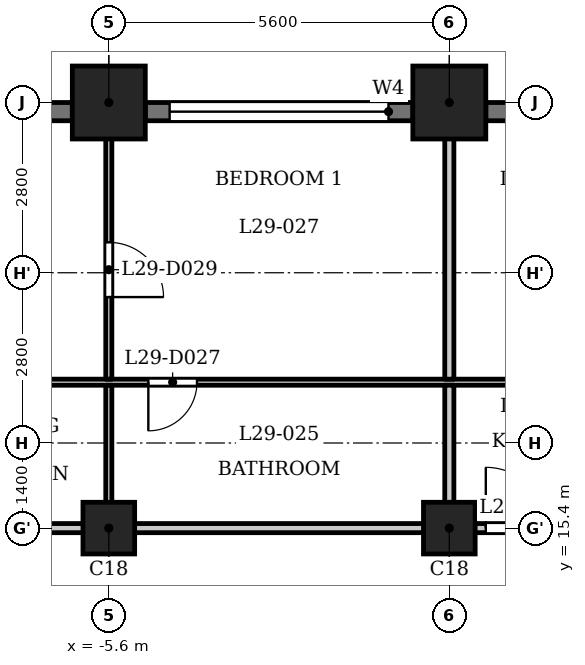
"""IFC4 building model, lengths in metres.
Left out: names, types, materials, properties, quantities, classifications, styles, units other than length and angle.
Written with IfcOpenShell. Run it as: python <this file> out.ifc"""

import sys

from ifc_helpers import new_model, si_unit, direction, frame, frame_2d, origin, origin_2d, place, context, subcontext, project, spatial, rectangle, extrude, element, fill, save


model = new_model("IFC4")
c1 = context("Model", 3, precision=1e-05, world=origin(), true_north=direction((0.0, 1.0)))
c2 = subcontext(c1, "Body", "Model", "MODEL_VIEW")
j1 = project(units=[si_unit("LENGTHUNIT", "METRE"), si_unit("PLANEANGLEUNIT", "RADIAN")], contexts=[c1])
p1 = place(None, origin())
s1 = spatial("IfcSite", under=j1, at=p1, CompositionType="ELEMENT")
p2 = place(p1, origin())
s2 = spatial("IfcBuilding", under=s1, at=p2, CompositionType="ELEMENT")
p3 = place(p2, frame((0.0, 0.0, 114.8)))
s3 = spatial("IfcBuildingStorey", under=s2, at=p3, CompositionType="ELEMENT", Elevation=114.8)
for number, where, z_axis, x_axis in (
    (1, (0.0, 22.4, 0.0), (0.0, 0.0, 1.0), (1.0, 0.0, 0.0)),
    (2, (-5.6, 22.4, 0.0), (0.0, 0.0, 1.0), (1.0, 0.0, 0.0)),
):
    element("IfcColumn", number, at=place(p3, frame(where, z_axis=z_axis, x_axis=x_axis)), inside=s3, PredefinedType="COLUMN", context=c2, shape_type="SweptSolid", body=[
        extrude(rectangle(XDim=1.2, YDim=1.2, at=origin_2d()), origin(), (0.0, 0.0, 1.0), 3.5),
    ])
for number, where, z_axis, x_axis in (
    (3, (-5.6, 15.4, 0.0), (0.0, 0.0, 1.0), (1.0, 0.0, 0.0)),
    (4, (0.0, 15.4, 0.0), (0.0, 0.0, 1.0), (1.0, 0.0, 0.0)),
):
    element("IfcColumn", number, at=place(p3, frame(where, z_axis=z_axis, x_axis=x_axis)), inside=s3, PredefinedType="COLUMN", context=c2, shape_type="SweptSolid", body=[
        extrude(rectangle(XDim=0.85, YDim=0.85, at=origin_2d()), origin(), (0.0, 0.0, 1.0), 3.5),
    ])
p4 = place(p3, frame((5.0, 22.25, 0.0), z_axis=(0.0, 0.0, 1.0), x_axis=(-1.0, 0.0, 0.0)))
e5 = element("IfcWall", 5, at=p4, inside=s3, PredefinedType="SOLIDWALL", context=c2, shape_type="SweptSolid", body=[
    extrude(rectangle(XDim=4.4, YDim=0.3, at=frame_2d((2.2, 0.0))), origin(), (0.0, 0.0, 1.0), 2.4),
])
p5 = place(p4, frame((0.4, 0.0, 1.2)))
e6 = element("IfcOpeningElement", 6, at=p5, cuts=e5, PredefinedType="OPENING", context=c2, shape_type="SweptSolid", body=[
    extrude(rectangle(XDim=3.6, YDim=0.95, at=frame_2d((1.8, 0.475))), frame((0.0, 0.16, 0.0), z_axis=(0.0, -1.0, 0.0), x_axis=(1.0, 0.0, 0.0)), (0.0, 0.0, 1.0), 0.32),
])
p6 = place(p3, frame((-0.6, 22.25, 0.0), z_axis=(0.0, 0.0, 1.0), x_axis=(-1.0, 0.0, 0.0)))
e7 = element("IfcWall", 7, at=p6, inside=s3, PredefinedType="SOLIDWALL", context=c2, shape_type="SweptSolid", body=[
    extrude(rectangle(XDim=4.4, YDim=0.3, at=frame_2d((2.2, 0.0))), origin(), (0.0, 0.0, 1.0), 2.4),
])
p7 = place(p6, frame((0.4, 0.0, 1.2)))
e8 = element("IfcOpeningElement", 8, at=p7, cuts=e7, PredefinedType="OPENING", context=c2, shape_type="SweptSolid", body=[
    extrude(rectangle(XDim=3.6, YDim=0.95, at=frame_2d((1.8, 0.475))), frame((0.0, 0.16, 0.0), z_axis=(0.0, -1.0, 0.0), x_axis=(1.0, 0.0, 0.0)), (0.0, 0.0, 1.0), 0.32),
])
p8 = place(p3, frame((-6.2, 22.25, 0.0), z_axis=(0.0, 0.0, 1.0), x_axis=(-1.0, 0.0, 0.0)))
e9 = element("IfcWall", 9, at=p8, inside=s3, PredefinedType="SOLIDWALL", context=c2, shape_type="SweptSolid", body=[
    extrude(rectangle(XDim=4.4, YDim=0.3, at=frame_2d((2.2, 0.0))), origin(), (0.0, 0.0, 1.0), 2.4),
])
p9 = place(p8, frame((0.4, 0.0, 1.2)))
e10 = element("IfcOpeningElement", 10, at=p9, cuts=e9, PredefinedType="OPENING", context=c2, shape_type="SweptSolid", body=[
    extrude(rectangle(XDim=3.6, YDim=0.95, at=frame_2d((1.8, 0.475))), frame((0.0, 0.16, 0.0), z_axis=(0.0, -1.0, 0.0), x_axis=(1.0, 0.0, 0.0)), (0.0, 0.0, 1.0), 0.32),
])
p10 = place(p3, frame((-27.484, 15.4, 0.0), z_axis=(0.0, 0.0, 1.0), x_axis=(1.0, 0.0, 0.0)))
e11 = element("IfcWall", 11, at=p10, inside=s3, PredefinedType="PARTITIONING", context=c2, shape_type="SweptSolid", body=[
    extrude(rectangle(XDim=54.968, YDim=0.15, at=frame_2d((27.484, 0.0))), origin(), (0.0, 0.0, 1.0), 3.2),
])
p11 = place(p10, frame((9.034, 0.0, 0.0)))
e12 = element("IfcOpeningElement", 12, at=p11, cuts=e11, PredefinedType="OPENING", context=c2, shape_type="SweptSolid", body=[
    extrude(rectangle(XDim=1.0, YDim=2.1, at=frame_2d((0.5, 1.05))), frame((0.0, 0.085, 0.0), z_axis=(0.0, -1.0, 0.0), x_axis=(1.0, 0.0, 0.0)), (0.0, 0.0, 1.0), 0.17),
])
p12 = place(p10, frame((14.634, 0.0, 0.0)))
e13 = element("IfcOpeningElement", 13, at=p12, cuts=e11, PredefinedType="OPENING", context=c2, shape_type="SweptSolid", body=[
    extrude(rectangle(XDim=1.0, YDim=2.1, at=frame_2d((0.5, 1.05))), frame((0.0, 0.085, 0.0), z_axis=(0.0, -1.0, 0.0), x_axis=(1.0, 0.0, 0.0)), (0.0, 0.0, 1.0), 0.17),
])
p13 = place(p10, frame((16.984, 0.0, 0.0)))
e14 = element("IfcOpeningElement", 14, at=p13, cuts=e11, PredefinedType="OPENING", context=c2, shape_type="SweptSolid", body=[
    extrude(rectangle(XDim=1.0, YDim=2.1, at=frame_2d((0.5, 1.05))), frame((0.0, 0.085, 0.0), z_axis=(0.0, -1.0, 0.0), x_axis=(1.0, 0.0, 0.0)), (0.0, 0.0, 1.0), 0.17),
])
p14 = place(p10, frame((28.084, 0.0, 0.0)))
e15 = element("IfcOpeningElement", 15, at=p14, cuts=e11, PredefinedType="OPENING", context=c2, shape_type="SweptSolid", body=[
    extrude(rectangle(XDim=1.0, YDim=2.1, at=frame_2d((0.5, 1.05))), frame((0.0, 0.085, 0.0), z_axis=(0.0, -1.0, 0.0), x_axis=(1.0, 0.0, 0.0)), (0.0, 0.0, 1.0), 0.17),
])
p15 = place(p10, frame((34.834, 0.0, 0.0)))
e16 = element("IfcOpeningElement", 16, at=p15, cuts=e11, PredefinedType="OPENING", context=c2, shape_type="SweptSolid", body=[
    extrude(rectangle(XDim=1.0, YDim=2.1, at=frame_2d((0.5, 1.05))), frame((0.0, 0.085, 0.0), z_axis=(0.0, -1.0, 0.0), x_axis=(1.0, 0.0, 0.0)), (0.0, 0.0, 1.0), 0.17),
])
p16 = place(p10, frame((41.884, 0.0, 0.0)))
e17 = element("IfcOpeningElement", 17, at=p16, cuts=e11, PredefinedType="OPENING", context=c2, shape_type="SweptSolid", body=[
    extrude(rectangle(XDim=1.0, YDim=2.1, at=frame_2d((0.5, 1.05))), frame((0.0, 0.085, 0.0), z_axis=(0.0, -1.0, 0.0), x_axis=(1.0, 0.0, 0.0)), (0.0, 0.0, 1.0), 0.17),
])
p17 = place(p10, frame((48.234, 0.0, 0.0)))
e18 = element("IfcOpeningElement", 18, at=p17, cuts=e11, PredefinedType="OPENING", context=c2, shape_type="SweptSolid", body=[
    extrude(rectangle(XDim=1.0, YDim=2.1, at=frame_2d((0.5, 1.05))), frame((0.0, 0.085, 0.0), z_axis=(0.0, -1.0, 0.0), x_axis=(1.0, 0.0, 0.0)), (0.0, 0.0, 1.0), 0.17),
])
p18 = place(p3, frame((-26.465, 17.8, 0.0), z_axis=(0.0, 0.0, 1.0), x_axis=(1.0, 0.0, 0.0)))
e19 = element("IfcWall", 19, at=p18, inside=s3, PredefinedType="PARTITIONING", context=c2, shape_type="SweptSolid", body=[
    extrude(rectangle(XDim=52.859, YDim=0.1, at=frame_2d((26.43, 0.0))), origin(), (0.0, 0.0, 1.0), 3.2),
])
p19 = place(p18, frame((2.697, 0.0, 0.0)))
e20 = element("IfcOpeningElement", 20, at=p19, cuts=e19, PredefinedType="OPENING", context=c2, shape_type="SweptSolid", body=[
    extrude(rectangle(XDim=0.8, YDim=2.1, at=frame_2d((0.4, 1.05))), frame((0.0, 0.06, 0.0), z_axis=(0.0, -1.0, 0.0), x_axis=(1.0, 0.0, 0.0)), (0.0, 0.0, 1.0), 0.12),
])
p20 = place(p18, frame((7.115, 0.0, 0.0)))
e21 = element("IfcOpeningElement", 21, at=p20, cuts=e19, PredefinedType="OPENING", context=c2, shape_type="SweptSolid", body=[
    extrude(rectangle(XDim=0.9, YDim=2.1, at=frame_2d((0.45, 1.05))), frame((0.0, 0.06, 0.0), z_axis=(0.0, -1.0, 0.0), x_axis=(1.0, 0.0, 0.0)), (0.0, 0.0, 1.0), 0.12),
])
p21 = place(p18, frame((10.315, 0.0, 0.0)))
e22 = element("IfcOpeningElement", 22, at=p21, cuts=e19, PredefinedType="OPENING", context=c2, shape_type="SweptSolid", body=[
    extrude(rectangle(XDim=0.8, YDim=2.1, at=frame_2d((0.4, 1.05))), frame((0.0, 0.06, 0.0), z_axis=(0.0, -1.0, 0.0), x_axis=(1.0, 0.0, 0.0)), (0.0, 0.0, 1.0), 0.12),
])
p22 = place(p18, frame((12.715, 0.0, 0.0)))
e23 = element("IfcOpeningElement", 23, at=p22, cuts=e19, PredefinedType="OPENING", context=c2, shape_type="SweptSolid", body=[
    extrude(rectangle(XDim=0.9, YDim=2.1, at=frame_2d((0.45, 1.05))), frame((0.0, 0.06, 0.0), z_axis=(0.0, -1.0, 0.0), x_axis=(1.0, 0.0, 0.0)), (0.0, 0.0, 1.0), 0.12),
])
p23 = place(p18, frame((21.515, 0.0, 0.0)))
e24 = element("IfcOpeningElement", 24, at=p23, cuts=e19, PredefinedType="OPENING", context=c2, shape_type="SweptSolid", body=[
    extrude(rectangle(XDim=0.8, YDim=2.1, at=frame_2d((0.4, 1.05))), frame((0.0, 0.06, 0.0), z_axis=(0.0, -1.0, 0.0), x_axis=(1.0, 0.0, 0.0)), (0.0, 0.0, 1.0), 0.12),
])
p24 = place(p18, frame((17.065, 0.0, 0.0)))
e25 = element("IfcOpeningElement", 25, at=p24, cuts=e19, PredefinedType="OPENING", context=c2, shape_type="SweptSolid", body=[
    extrude(rectangle(XDim=0.9, YDim=2.1, at=frame_2d((0.45, 1.05))), frame((0.0, 0.06, 0.0), z_axis=(0.0, -1.0, 0.0), x_axis=(1.0, 0.0, 0.0)), (0.0, 0.0, 1.0), 0.12),
])
p25 = place(p18, frame((30.365, 0.0, 0.0)))
e26 = element("IfcOpeningElement", 26, at=p25, cuts=e19, PredefinedType="OPENING", context=c2, shape_type="SweptSolid", body=[
    extrude(rectangle(XDim=0.8, YDim=2.1, at=frame_2d((0.4, 1.05))), frame((0.0, 0.06, 0.0), z_axis=(0.0, -1.0, 0.0), x_axis=(1.0, 0.0, 0.0)), (0.0, 0.0, 1.0), 0.12),
])
p26 = place(p18, frame((28.165, 0.0, 0.0)))
e27 = element("IfcOpeningElement", 27, at=p26, cuts=e19, PredefinedType="OPENING", context=c2, shape_type="SweptSolid", body=[
    extrude(rectangle(XDim=0.9, YDim=2.1, at=frame_2d((0.45, 1.05))), frame((0.0, 0.06, 0.0), z_axis=(0.0, -1.0, 0.0), x_axis=(1.0, 0.0, 0.0)), (0.0, 0.0, 1.0), 0.12),
])
p27 = place(p18, frame((36.115, 0.0, 0.0)))
e28 = element("IfcOpeningElement", 28, at=p27, cuts=e19, PredefinedType="OPENING", context=c2, shape_type="SweptSolid", body=[
    extrude(rectangle(XDim=0.8, YDim=2.1, at=frame_2d((0.4, 1.05))), frame((0.0, 0.06, 0.0), z_axis=(0.0, -1.0, 0.0), x_axis=(1.0, 0.0, 0.0)), (0.0, 0.0, 1.0), 0.12),
])
p28 = place(p18, frame((32.915, 0.0, 0.0)))
e29 = element("IfcOpeningElement", 29, at=p28, cuts=e19, PredefinedType="OPENING", context=c2, shape_type="SweptSolid", body=[
    extrude(rectangle(XDim=0.9, YDim=2.1, at=frame_2d((0.45, 1.05))), frame((0.0, 0.06, 0.0), z_axis=(0.0, -1.0, 0.0), x_axis=(1.0, 0.0, 0.0)), (0.0, 0.0, 1.0), 0.12),
])
p29 = place(p18, frame((38.315, 0.0, 0.0)))
e30 = element("IfcOpeningElement", 30, at=p29, cuts=e19, PredefinedType="OPENING", context=c2, shape_type="SweptSolid", body=[
    extrude(rectangle(XDim=0.8, YDim=2.1, at=frame_2d((0.4, 1.05))), frame((0.0, 0.06, 0.0), z_axis=(0.0, -1.0, 0.0), x_axis=(1.0, 0.0, 0.0)), (0.0, 0.0, 1.0), 0.12),
])
p30 = place(p18, frame((40.965, 0.0, 0.0)))
e31 = element("IfcOpeningElement", 31, at=p30, cuts=e19, PredefinedType="OPENING", context=c2, shape_type="SweptSolid", body=[
    extrude(rectangle(XDim=0.9, YDim=2.1, at=frame_2d((0.45, 1.05))), frame((0.0, 0.06, 0.0), z_axis=(0.0, -1.0, 0.0), x_axis=(1.0, 0.0, 0.0)), (0.0, 0.0, 1.0), 0.12),
])
p31 = place(p18, frame((51.265, 0.0, 0.0)))
e32 = element("IfcOpeningElement", 32, at=p31, cuts=e19, PredefinedType="OPENING", context=c2, shape_type="SweptSolid", body=[
    extrude(rectangle(XDim=0.8, YDim=2.1, at=frame_2d((0.4, 1.05))), frame((0.0, 0.06, 0.0), z_axis=(0.0, -1.0, 0.0), x_axis=(1.0, 0.0, 0.0)), (0.0, 0.0, 1.0), 0.12),
])
p32 = place(p18, frame((46.315, 0.0, 0.0)))
e33 = element("IfcOpeningElement", 33, at=p32, cuts=e19, PredefinedType="OPENING", context=c2, shape_type="SweptSolid", body=[
    extrude(rectangle(XDim=0.9, YDim=2.1, at=frame_2d((0.45, 1.05))), frame((0.0, 0.06, 0.0), z_axis=(0.0, -1.0, 0.0), x_axis=(1.0, 0.0, 0.0)), (0.0, 0.0, 1.0), 0.12),
])
p33 = place(p3, frame((-5.6, 15.475, 0.0), z_axis=(0.0, 0.0, 1.0), x_axis=(0.0, 1.0, 0.0)))
e34 = element("IfcWall", 34, at=p33, inside=s3, PredefinedType="PARTITIONING", context=c2, shape_type="SweptSolid", body=[
    extrude(rectangle(XDim=2.275, YDim=0.1, at=frame_2d((1.137, 0.0))), origin(), (0.0, 0.0, 1.0), 3.2),
])
p34 = place(p3, frame((-5.6, 17.85, 0.0), z_axis=(0.0, 0.0, 1.0), x_axis=(0.0, 1.0, 0.0)))
e35 = element("IfcWall", 35, at=p34, inside=s3, PredefinedType="PARTITIONING", context=c2, shape_type="SweptSolid", body=[
    extrude(rectangle(XDim=5.13, YDim=0.1, at=frame_2d((2.565, 0.0))), origin(), (0.0, 0.0, 1.0), 3.2),
])
p35 = place(p34, frame((1.35, 0.0, 0.0)))
e36 = element("IfcOpeningElement", 36, at=p35, cuts=e35, PredefinedType="OPENING", context=c2, shape_type="SweptSolid", body=[
    extrude(rectangle(XDim=0.9, YDim=2.1, at=frame_2d((0.45, 1.05))), frame((0.0, 0.06, 0.0), z_axis=(0.0, -1.0, 0.0), x_axis=(1.0, 0.0, 0.0)), (0.0, 0.0, 1.0), 0.12),
])
p36 = place(p3, frame((0.0, 15.475, 0.0), z_axis=(0.0, 0.0, 1.0), x_axis=(0.0, 1.0, 0.0)))
e37 = element("IfcWall", 37, at=p36, inside=s3, PredefinedType="PARTITIONING", context=c2, shape_type="SweptSolid", body=[
    extrude(rectangle(XDim=2.275, YDim=0.15, at=frame_2d((1.137, 0.0))), origin(), (0.0, 0.0, 1.0), 3.2),
])
p37 = place(p3, frame((0.0, 17.85, 0.0), z_axis=(0.0, 0.0, 1.0), x_axis=(0.0, 1.0, 0.0)))
e38 = element("IfcWall", 38, at=p37, inside=s3, PredefinedType="PARTITIONING", context=c2, shape_type="SweptSolid", body=[
    extrude(rectangle(XDim=5.13, YDim=0.15, at=frame_2d((2.565, 0.0))), origin(), (0.0, 0.0, 1.0), 3.2),
])
p38 = place(p23, origin())
e39 = element("IfcDoor", 39, at=p38, inside=s3, OperationType="SINGLE_SWING_LEFT", PredefinedType="DOOR", context=c2, shape_type="SweptSolid", body=[
    extrude(rectangle(XDim=0.8, YDim=2.1, at=frame_2d((0.4, 1.05))), frame((0.0, 0.025, 0.0), z_axis=(0.0, -1.0, 0.0), x_axis=(1.0, 0.0, 0.0)), (0.0, 0.0, 1.0), 0.05),
])
fill(e24, e39)
p39 = place(p35, origin())
e40 = element("IfcDoor", 40, at=p39, inside=s3, OperationType="SINGLE_SWING_LEFT", PredefinedType="DOOR", context=c2, shape_type="SweptSolid", body=[
    extrude(rectangle(XDim=0.9, YDim=2.1, at=frame_2d((0.45, 1.05))), frame((0.0, 0.025, 0.0), z_axis=(0.0, -1.0, 0.0), x_axis=(1.0, 0.0, 0.0)), (0.0, 0.0, 1.0), 0.05),
])
fill(e36, e40)
p40 = place(p14, origin())
e41 = element("IfcDoor", 41, at=p40, inside=s3, OperationType="SINGLE_SWING_RIGHT", PredefinedType="DOOR", context=c2, shape_type="SweptSolid", body=[
    extrude(rectangle(XDim=1.0, YDim=2.1, at=frame_2d((0.5, 1.05))), frame((0.0, 0.025, 0.0), z_axis=(0.0, -1.0, 0.0), x_axis=(1.0, 0.0, 0.0)), (0.0, 0.0, 1.0), 0.05),
])
fill(e15, e41)
p41 = place(p7, origin())
e42 = element("IfcWindow", 42, at=p41, inside=s3, PartitioningType="SINGLE_PANEL", PredefinedType="WINDOW", context=c2, shape_type="SweptSolid", body=[
    extrude(rectangle(XDim=3.6, YDim=0.95, at=frame_2d((1.8, 0.475))), frame((0.0, 0.03, 0.0), z_axis=(0.0, -1.0, 0.0), x_axis=(1.0, 0.0, 0.0)), (0.0, 0.0, 1.0), 0.06),
])
fill(e8, e42)
save(model, sys.argv[1])
